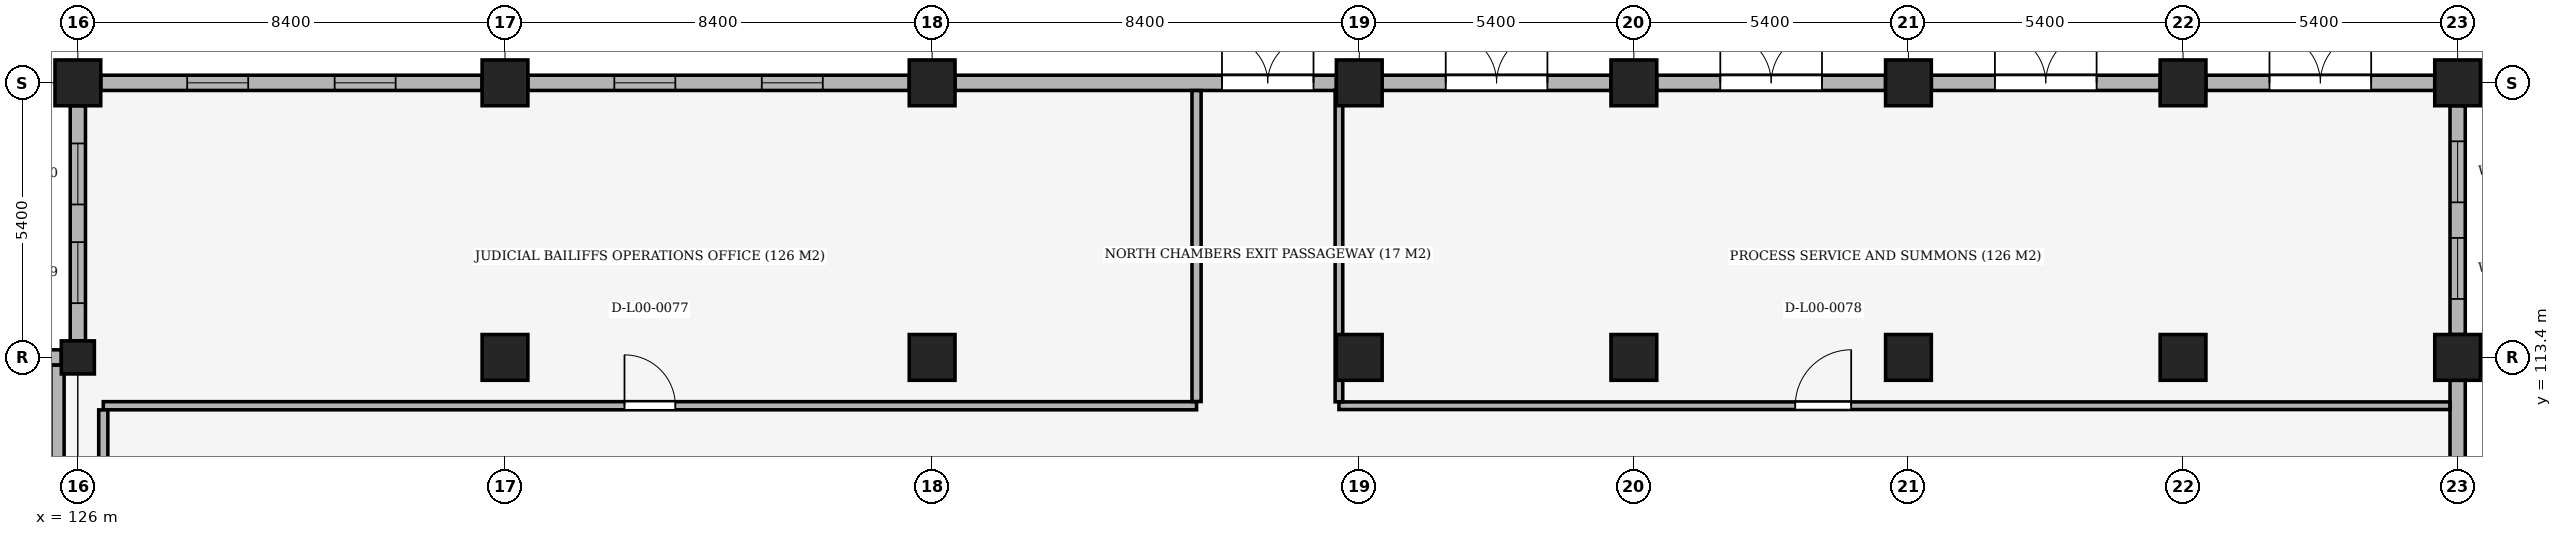
"""IFC4 building model, lengths in metres.
Left out: names, types, materials, properties, quantities, classifications, styles, units other than length and angle.
Written with IfcOpenShell. Run it as: python <this file> out.ifc"""

import sys

from ifc_helpers import new_model, si_unit, direction, frame, frame_2d, origin, origin_2d, place, context, subcontext, project, spatial, rectangle, extrude, element, fill, save


model = new_model("IFC4")
c1 = context("Model", 3, precision=1e-05, world=origin(), true_north=direction((0.0, 1.0)))
c2 = subcontext(c1, "Body", "Model", "MODEL_VIEW")
j1 = project(units=[si_unit("LENGTHUNIT", "METRE"), si_unit("PLANEANGLEUNIT", "RADIAN")], contexts=[c1])
p1 = place(None, origin())
s1 = spatial("IfcSite", under=j1, at=p1, CompositionType="ELEMENT")
p2 = place(p1, origin())
s2 = spatial("IfcBuilding", under=s1, at=p2, CompositionType="ELEMENT")
p3 = place(p2, origin())
s3 = spatial("IfcBuildingStorey", under=s2, at=p3, CompositionType="ELEMENT", Elevation=0.0)
p4 = place(p3, frame((126.0, 113.4, 0.0), z_axis=(0.0, 0.0, 1.0), x_axis=(1.0, 0.0, 0.0)))
e1 = element("IfcColumn", 1, at=p4, inside=s3, PredefinedType="COLUMN", context=c2, shape_type="SweptSolid", body=[
    extrude(rectangle(XDim=0.65, YDim=0.65, at=origin_2d()), origin(), (0.0, 0.0, 1.0), 5.1),
])
for number, where, z_axis, x_axis in (
    (2, (126.0, 118.8, 0.0), (0.0, 0.0, 1.0), (1.0, 0.0, 0.0)),
    (3, (134.4, 113.4, 0.0), (0.0, 0.0, 1.0), (1.0, 0.0, 0.0)),
    (4, (134.4, 118.8, 0.0), (0.0, 0.0, 1.0), (1.0, 0.0, 0.0)),
    (5, (142.8, 113.4, 0.0), (0.0, 0.0, 1.0), (1.0, 0.0, 0.0)),
    (6, (142.8, 118.8, 0.0), (0.0, 0.0, 1.0), (1.0, 0.0, 0.0)),
    (7, (151.2, 113.4, 0.0), (0.0, 0.0, 1.0), (1.0, 0.0, 0.0)),
    (8, (151.2, 118.8, 0.0), (0.0, 0.0, 1.0), (1.0, 0.0, 0.0)),
    (9, (156.6, 113.4, 0.0), (0.0, 0.0, 1.0), (1.0, 0.0, 0.0)),
    (10, (156.6, 118.8, 0.0), (0.0, 0.0, 1.0), (1.0, 0.0, 0.0)),
    (11, (162.0, 113.4, 0.0), (0.0, 0.0, 1.0), (1.0, 0.0, 0.0)),
    (12, (162.0, 118.8, 0.0), (0.0, 0.0, 1.0), (1.0, 0.0, 0.0)),
    (13, (167.4, 113.4, 0.0), (0.0, 0.0, 1.0), (1.0, 0.0, 0.0)),
    (14, (167.4, 118.8, 0.0), (0.0, 0.0, 1.0), (1.0, 0.0, 0.0)),
    (15, (172.8, 113.4, 0.0), (0.0, 0.0, 1.0), (1.0, 0.0, 0.0)),
    (16, (172.8, 118.8, 0.0), (0.0, 0.0, 1.0), (1.0, 0.0, 0.0)),
):
    element("IfcColumn", number, at=place(p3, frame(where, z_axis=z_axis, x_axis=x_axis)), inside=s3, PredefinedType="COLUMN", context=c2, shape_type="SweptSolid", body=[
        extrude(rectangle(XDim=0.9, YDim=0.9, at=origin_2d()), origin(), (0.0, 0.0, 1.0), 5.1),
    ])
p5 = place(p3, frame((117.925, 113.4, 0.0), z_axis=(0.0, 0.0, 1.0), x_axis=(1.0, 0.0, 0.0)))
e17 = element("IfcWall", 17, at=p5, inside=s3, PredefinedType="SOLIDWALL", context=c2, shape_type="SweptSolid", body=[
    extrude(rectangle(XDim=7.75, YDim=0.3, at=frame_2d((3.875, 0.0))), origin(), (0.0, 0.0, 1.0), 4.12),
])
p6 = place(p5, frame((1.183, 0.0, 0.9)))
e18 = element("IfcOpeningElement", 18, at=p6, cuts=e17, PredefinedType="OPENING", context=c2, shape_type="SweptSolid", body=[
    extrude(rectangle(XDim=2.1, YDim=2.1, at=frame_2d((1.05, 1.05))), frame((0.0, 0.165, 0.0), z_axis=(0.0, -1.0, 0.0), x_axis=(1.0, 0.0, 0.0)), (0.0, 0.0, 1.0), 0.33),
])
p7 = place(p5, frame((4.467, 0.0, 0.9)))
e19 = element("IfcOpeningElement", 19, at=p7, cuts=e17, PredefinedType="OPENING", context=c2, shape_type="SweptSolid", body=[
    extrude(rectangle(XDim=2.1, YDim=2.1, at=frame_2d((1.05, 1.05))), frame((0.0, 0.165, 0.0), z_axis=(0.0, -1.0, 0.0), x_axis=(1.0, 0.0, 0.0)), (0.0, 0.0, 1.0), 0.33),
])
p8 = place(p3, frame((126.0, 113.725, 0.0), z_axis=(0.0, 0.0, 1.0), x_axis=(0.0, 1.0, 0.0)))
e20 = element("IfcWall", 20, at=p8, inside=s3, PredefinedType="SOLIDWALL", context=c2, shape_type="SweptSolid", body=[
    extrude(rectangle(XDim=4.625, YDim=0.3, at=frame_2d((2.312, 0.0))), origin(), (0.0, 0.0, 1.0), 4.17),
])
p9 = place(p8, frame((0.742, 0.0, 0.85)))
e21 = element("IfcOpeningElement", 21, at=p9, cuts=e20, PredefinedType="OPENING", context=c2, shape_type="SweptSolid", body=[
    extrude(rectangle(XDim=1.2, YDim=2.4, at=frame_2d((0.6, 1.2))), frame((0.0, 0.165, 0.0), z_axis=(0.0, -1.0, 0.0), x_axis=(1.0, 0.0, 0.0)), (0.0, 0.0, 1.0), 0.33),
])
p10 = place(p8, frame((2.683, 0.0, 0.85)))
e22 = element("IfcOpeningElement", 22, at=p10, cuts=e20, PredefinedType="OPENING", context=c2, shape_type="SweptSolid", body=[
    extrude(rectangle(XDim=1.2, YDim=2.4, at=frame_2d((0.6, 1.2))), frame((0.0, 0.165, 0.0), z_axis=(0.0, -1.0, 0.0), x_axis=(1.0, 0.0, 0.0)), (0.0, 0.0, 1.0), 0.33),
])
p11 = place(p3, frame((126.45, 118.8, 0.0), z_axis=(0.0, 0.0, 1.0), x_axis=(1.0, 0.0, 0.0)))
e23 = element("IfcWall", 23, at=p11, inside=s3, PredefinedType="SOLIDWALL", context=c2, shape_type="SweptSolid", body=[
    extrude(rectangle(XDim=7.5, YDim=0.3, at=frame_2d((3.75, 0.0))), origin(), (0.0, 0.0, 1.0), 4.12),
])
p12 = place(p11, frame((1.7, 0.0, 0.85)))
e24 = element("IfcOpeningElement", 24, at=p12, cuts=e23, PredefinedType="OPENING", context=c2, shape_type="SweptSolid", body=[
    extrude(rectangle(XDim=1.2, YDim=2.4, at=frame_2d((0.6, 1.2))), frame((0.0, 0.165, 0.0), z_axis=(0.0, -1.0, 0.0), x_axis=(1.0, 0.0, 0.0)), (0.0, 0.0, 1.0), 0.33),
])
p13 = place(p11, frame((4.6, 0.0, 0.85)))
e25 = element("IfcOpeningElement", 25, at=p13, cuts=e23, PredefinedType="OPENING", context=c2, shape_type="SweptSolid", body=[
    extrude(rectangle(XDim=1.2, YDim=2.4, at=frame_2d((0.6, 1.2))), frame((0.0, 0.165, 0.0), z_axis=(0.0, -1.0, 0.0), x_axis=(1.0, 0.0, 0.0)), (0.0, 0.0, 1.0), 0.33),
])
p14 = place(p3, frame((134.85, 118.8, 0.0), z_axis=(0.0, 0.0, 1.0), x_axis=(1.0, 0.0, 0.0)))
e26 = element("IfcWall", 26, at=p14, inside=s3, PredefinedType="SOLIDWALL", context=c2, shape_type="SweptSolid", body=[
    extrude(rectangle(XDim=7.5, YDim=0.3, at=frame_2d((3.75, 0.0))), origin(), (0.0, 0.0, 1.0), 4.12),
])
p15 = place(p14, frame((1.7, 0.0, 0.85)))
e27 = element("IfcOpeningElement", 27, at=p15, cuts=e26, PredefinedType="OPENING", context=c2, shape_type="SweptSolid", body=[
    extrude(rectangle(XDim=1.2, YDim=2.4, at=frame_2d((0.6, 1.2))), frame((0.0, 0.165, 0.0), z_axis=(0.0, -1.0, 0.0), x_axis=(1.0, 0.0, 0.0)), (0.0, 0.0, 1.0), 0.33),
])
p16 = place(p14, frame((4.6, 0.0, 0.85)))
e28 = element("IfcOpeningElement", 28, at=p16, cuts=e26, PredefinedType="OPENING", context=c2, shape_type="SweptSolid", body=[
    extrude(rectangle(XDim=1.2, YDim=2.4, at=frame_2d((0.6, 1.2))), frame((0.0, 0.165, 0.0), z_axis=(0.0, -1.0, 0.0), x_axis=(1.0, 0.0, 0.0)), (0.0, 0.0, 1.0), 0.33),
])
p17 = place(p3, frame((143.25, 118.8, 0.0), z_axis=(0.0, 0.0, 1.0), x_axis=(1.0, 0.0, 0.0)))
e29 = element("IfcWall", 29, at=p17, inside=s3, PredefinedType="SOLIDWALL", context=c2, shape_type="SweptSolid", body=[
    extrude(rectangle(XDim=7.5, YDim=0.3, at=frame_2d((3.75, 0.0))), origin(), (0.0, 0.0, 1.0), 4.12),
])
p18 = place(p17, frame((5.25, 0.0, 0.0)))
e30 = element("IfcOpeningElement", 30, at=p18, cuts=e29, PredefinedType="OPENING", context=c2, shape_type="SweptSolid", body=[
    extrude(rectangle(XDim=1.8, YDim=2.2, at=frame_2d((0.9, 1.1))), frame((0.0, 0.165, 0.0), z_axis=(0.0, -1.0, 0.0), x_axis=(1.0, 0.0, 0.0)), (0.0, 0.0, 1.0), 0.33),
])
p19 = place(p3, frame((151.65, 118.8, 0.0), z_axis=(0.0, 0.0, 1.0), x_axis=(1.0, 0.0, 0.0)))
e31 = element("IfcWall", 31, at=p19, inside=s3, PredefinedType="SOLIDWALL", context=c2, shape_type="SweptSolid", body=[
    extrude(rectangle(XDim=4.5, YDim=0.3, at=frame_2d((2.25, 0.0))), origin(), (0.0, 0.0, 1.0), 4.22),
])
p20 = place(p19, frame((1.25, 0.0, 0.0)))
e32 = element("IfcOpeningElement", 32, at=p20, cuts=e31, PredefinedType="OPENING", context=c2, shape_type="SweptSolid", body=[
    extrude(rectangle(XDim=2.0, YDim=2.4, at=frame_2d((1.0, 1.2))), frame((0.0, 0.165, 0.0), z_axis=(0.0, -1.0, 0.0), x_axis=(1.0, 0.0, 0.0)), (0.0, 0.0, 1.0), 0.33),
])
p21 = place(p3, frame((157.05, 118.8, 0.0), z_axis=(0.0, 0.0, 1.0), x_axis=(1.0, 0.0, 0.0)))
e33 = element("IfcWall", 33, at=p21, inside=s3, PredefinedType="SOLIDWALL", context=c2, shape_type="SweptSolid", body=[
    extrude(rectangle(XDim=4.5, YDim=0.3, at=frame_2d((2.25, 0.0))), origin(), (0.0, 0.0, 1.0), 4.22),
])
p22 = place(p21, frame((1.25, 0.0, 0.0)))
e34 = element("IfcOpeningElement", 34, at=p22, cuts=e33, PredefinedType="OPENING", context=c2, shape_type="SweptSolid", body=[
    extrude(rectangle(XDim=2.0, YDim=2.4, at=frame_2d((1.0, 1.2))), frame((0.0, 0.165, 0.0), z_axis=(0.0, -1.0, 0.0), x_axis=(1.0, 0.0, 0.0)), (0.0, 0.0, 1.0), 0.33),
])
p23 = place(p3, frame((162.45, 118.8, 0.0), z_axis=(0.0, 0.0, 1.0), x_axis=(1.0, 0.0, 0.0)))
e35 = element("IfcWall", 35, at=p23, inside=s3, PredefinedType="SOLIDWALL", context=c2, shape_type="SweptSolid", body=[
    extrude(rectangle(XDim=4.5, YDim=0.3, at=frame_2d((2.25, 0.0))), origin(), (0.0, 0.0, 1.0), 4.22),
])
p24 = place(p23, frame((1.25, 0.0, 0.0)))
e36 = element("IfcOpeningElement", 36, at=p24, cuts=e35, PredefinedType="OPENING", context=c2, shape_type="SweptSolid", body=[
    extrude(rectangle(XDim=2.0, YDim=2.4, at=frame_2d((1.0, 1.2))), frame((0.0, 0.165, 0.0), z_axis=(0.0, -1.0, 0.0), x_axis=(1.0, 0.0, 0.0)), (0.0, 0.0, 1.0), 0.33),
])
p25 = place(p3, frame((167.85, 118.8, 0.0), z_axis=(0.0, 0.0, 1.0), x_axis=(1.0, 0.0, 0.0)))
e37 = element("IfcWall", 37, at=p25, inside=s3, PredefinedType="SOLIDWALL", context=c2, shape_type="SweptSolid", body=[
    extrude(rectangle(XDim=4.5, YDim=0.3, at=frame_2d((2.25, 0.0))), origin(), (0.0, 0.0, 1.0), 4.22),
])
p26 = place(p25, frame((1.25, 0.0, 0.0)))
e38 = element("IfcOpeningElement", 38, at=p26, cuts=e37, PredefinedType="OPENING", context=c2, shape_type="SweptSolid", body=[
    extrude(rectangle(XDim=2.0, YDim=2.4, at=frame_2d((1.0, 1.2))), frame((0.0, 0.165, 0.0), z_axis=(0.0, -1.0, 0.0), x_axis=(1.0, 0.0, 0.0)), (0.0, 0.0, 1.0), 0.33),
])
p27 = place(p3, frame((172.8, 118.35, 0.0), z_axis=(0.0, 0.0, 1.0), x_axis=(0.0, -1.0, 0.0)))
e39 = element("IfcWall", 39, at=p27, inside=s3, PredefinedType="SOLIDWALL", context=c2, shape_type="SweptSolid", body=[
    extrude(rectangle(XDim=4.5, YDim=0.3, at=frame_2d((2.25, 0.0))), origin(), (0.0, 0.0, 1.0), 4.17),
])
p28 = place(p27, frame((0.7, 0.0, 0.85)))
e40 = element("IfcOpeningElement", 40, at=p28, cuts=e39, PredefinedType="OPENING", context=c2, shape_type="SweptSolid", body=[
    extrude(rectangle(XDim=1.2, YDim=2.4, at=frame_2d((0.6, 1.2))), frame((0.0, 0.165, 0.0), z_axis=(0.0, -1.0, 0.0), x_axis=(1.0, 0.0, 0.0)), (0.0, 0.0, 1.0), 0.33),
])
p29 = place(p27, frame((2.6, 0.0, 0.85)))
e41 = element("IfcOpeningElement", 41, at=p29, cuts=e39, PredefinedType="OPENING", context=c2, shape_type="SweptSolid", body=[
    extrude(rectangle(XDim=1.2, YDim=2.4, at=frame_2d((0.6, 1.2))), frame((0.0, 0.165, 0.0), z_axis=(0.0, -1.0, 0.0), x_axis=(1.0, 0.0, 0.0)), (0.0, 0.0, 1.0), 0.33),
])
p30 = place(p3, frame((172.8, 112.95, 0.0), z_axis=(0.0, 0.0, 1.0), x_axis=(0.0, -1.0, 0.0)))
e42 = element("IfcWall", 42, at=p30, inside=s3, PredefinedType="SOLIDWALL", context=c2, shape_type="SweptSolid", body=[
    extrude(rectangle(XDim=4.5, YDim=0.3, at=frame_2d((2.25, 0.0))), origin(), (0.0, 0.0, 1.0), 4.17),
])
p31 = place(p30, frame((1.55, 0.0, 0.0)))
e43 = element("IfcOpeningElement", 43, at=p31, cuts=e42, PredefinedType="OPENING", context=c2, shape_type="SweptSolid", body=[
    extrude(rectangle(XDim=1.8, YDim=2.2, at=frame_2d((0.9, 1.1))), frame((0.0, 0.165, 0.0), z_axis=(0.0, -1.0, 0.0), x_axis=(1.0, 0.0, 0.0)), (0.0, 0.0, 1.0), 0.33),
])
p32 = place(p3, frame((126.5, 112.45, 0.0), z_axis=(0.0, 0.0, 1.0), x_axis=(1.0, 0.0, 0.0)))
e44 = element("IfcWall", 44, at=p32, inside=s3, PredefinedType="PARTITIONING", context=c2, shape_type="SweptSolid", body=[
    extrude(rectangle(XDim=21.5, YDim=0.16, at=frame_2d((10.75, 0.0))), origin(), (0.0, 0.0, 1.0), 4.17),
])
p33 = place(p32, frame((10.25, 0.0, 0.0)))
e45 = element("IfcOpeningElement", 45, at=p33, cuts=e44, PredefinedType="OPENING", context=c2, shape_type="SweptSolid", body=[
    extrude(rectangle(XDim=1.0, YDim=2.1, at=frame_2d((0.5, 1.05))), frame((0.0, 0.095, 0.0), z_axis=(0.0, -1.0, 0.0), x_axis=(1.0, 0.0, 0.0)), (0.0, 0.0, 1.0), 0.19),
])
p34 = place(p3, frame((150.8, 112.45, 0.0), z_axis=(0.0, 0.0, 1.0), x_axis=(1.0, 0.0, 0.0)))
e46 = element("IfcWall", 46, at=p34, inside=s3, PredefinedType="PARTITIONING", context=c2, shape_type="SweptSolid", body=[
    extrude(rectangle(XDim=21.848, YDim=0.15, at=frame_2d((10.924, 0.0))), origin(), (0.0, 0.0, 1.0), 4.17),
])
p35 = place(p34, frame((8.974, 0.0, 0.0)))
e47 = element("IfcOpeningElement", 47, at=p35, cuts=e46, PredefinedType="OPENING", context=c2, shape_type="SweptSolid", body=[
    extrude(rectangle(XDim=1.1, YDim=2.1, at=frame_2d((0.55, 1.05))), frame((0.0, 0.09, 0.0), z_axis=(0.0, -1.0, 0.0), x_axis=(1.0, 0.0, 0.0)), (0.0, 0.0, 1.0), 0.18),
])
p36 = place(p3, frame((125.6, 103.522, 0.0), z_axis=(0.0, 0.0, 1.0), x_axis=(0.0, 1.0, 0.0)))
e48 = element("IfcWall", 48, at=p36, inside=s3, PredefinedType="PARTITIONING", context=c2, shape_type="SweptSolid", body=[
    extrude(rectangle(XDim=9.726, YDim=0.26, at=frame_2d((4.863, 0.0))), origin(), (0.0, 0.0, 1.0), 4.12),
])
p37 = place(p3, frame((126.5, 108.55, 0.0), z_axis=(0.0, 0.0, 1.0), x_axis=(0.0, 1.0, 0.0)))
e49 = element("IfcWall", 49, at=p37, inside=s3, PredefinedType="PARTITIONING", context=c2, shape_type="SweptSolid", body=[
    extrude(rectangle(XDim=3.818, YDim=0.18, at=frame_2d((1.909, 0.0))), origin(), (0.0, 0.0, 1.0), 4.82),
])
p38 = place(p3, frame((148.0, 112.532, 0.0), z_axis=(0.0, 0.0, 1.0), x_axis=(0.0, 1.0, 0.0)))
e50 = element("IfcWall", 50, at=p38, inside=s3, PredefinedType="PARTITIONING", context=c2, shape_type="SweptSolid", body=[
    extrude(rectangle(XDim=6.116, YDim=0.18, at=frame_2d((3.058, 0.0))), origin(), (0.0, 0.0, 1.0), 4.12),
])
p39 = place(p3, frame((150.8, 112.527, 0.0), z_axis=(0.0, 0.0, 1.0), x_axis=(0.0, 1.0, 0.0)))
e51 = element("IfcWall", 51, at=p39, inside=s3, PredefinedType="PARTITIONING", context=c2, shape_type="SweptSolid", body=[
    extrude(rectangle(XDim=6.13, YDim=0.15, at=frame_2d((3.065, 0.0))), origin(), (0.0, 0.0, 1.0), 4.12),
])
p40 = place(p9, origin())
e52 = element("IfcWindow", 52, at=p40, inside=s3, PartitioningType="SINGLE_PANEL", PredefinedType="WINDOW", context=c2, shape_type="SweptSolid", body=[
    extrude(rectangle(XDim=1.2, YDim=2.4, at=frame_2d((0.6, 1.2))), frame((0.0, 0.03, 0.0), z_axis=(0.0, -1.0, 0.0), x_axis=(1.0, 0.0, 0.0)), (0.0, 0.0, 1.0), 0.06),
])
fill(e21, e52)
p41 = place(p10, origin())
e53 = element("IfcWindow", 53, at=p41, inside=s3, PartitioningType="SINGLE_PANEL", PredefinedType="WINDOW", context=c2, shape_type="SweptSolid", body=[
    extrude(rectangle(XDim=1.2, YDim=2.4, at=frame_2d((0.6, 1.2))), frame((0.0, 0.03, 0.0), z_axis=(0.0, -1.0, 0.0), x_axis=(1.0, 0.0, 0.0)), (0.0, 0.0, 1.0), 0.06),
])
fill(e22, e53)
p42 = place(p12, origin())
e54 = element("IfcWindow", 54, at=p42, inside=s3, PartitioningType="SINGLE_PANEL", PredefinedType="WINDOW", context=c2, shape_type="SweptSolid", body=[
    extrude(rectangle(XDim=1.2, YDim=2.4, at=frame_2d((0.6, 1.2))), frame((0.0, 0.03, 0.0), z_axis=(0.0, -1.0, 0.0), x_axis=(1.0, 0.0, 0.0)), (0.0, 0.0, 1.0), 0.06),
])
fill(e24, e54)
p43 = place(p13, origin())
e55 = element("IfcWindow", 55, at=p43, inside=s3, PartitioningType="SINGLE_PANEL", PredefinedType="WINDOW", context=c2, shape_type="SweptSolid", body=[
    extrude(rectangle(XDim=1.2, YDim=2.4, at=frame_2d((0.6, 1.2))), frame((0.0, 0.03, 0.0), z_axis=(0.0, -1.0, 0.0), x_axis=(1.0, 0.0, 0.0)), (0.0, 0.0, 1.0), 0.06),
])
fill(e25, e55)
p44 = place(p15, origin())
e56 = element("IfcWindow", 56, at=p44, inside=s3, PartitioningType="SINGLE_PANEL", PredefinedType="WINDOW", context=c2, shape_type="SweptSolid", body=[
    extrude(rectangle(XDim=1.2, YDim=2.4, at=frame_2d((0.6, 1.2))), frame((0.0, 0.03, 0.0), z_axis=(0.0, -1.0, 0.0), x_axis=(1.0, 0.0, 0.0)), (0.0, 0.0, 1.0), 0.06),
])
fill(e27, e56)
p45 = place(p16, origin())
e57 = element("IfcWindow", 57, at=p45, inside=s3, PartitioningType="SINGLE_PANEL", PredefinedType="WINDOW", context=c2, shape_type="SweptSolid", body=[
    extrude(rectangle(XDim=1.2, YDim=2.4, at=frame_2d((0.6, 1.2))), frame((0.0, 0.03, 0.0), z_axis=(0.0, -1.0, 0.0), x_axis=(1.0, 0.0, 0.0)), (0.0, 0.0, 1.0), 0.06),
])
fill(e28, e57)
p46 = place(p18, origin())
e58 = element("IfcDoor", 58, at=p46, inside=s3, OperationType="DOUBLE_DOOR_SINGLE_SWING", PredefinedType="DOOR", context=c2, shape_type="SweptSolid", body=[
    extrude(rectangle(XDim=1.8, YDim=2.2, at=frame_2d((0.9, 1.1))), frame((0.0, 0.025, 0.0), z_axis=(0.0, -1.0, 0.0), x_axis=(1.0, 0.0, 0.0)), (0.0, 0.0, 1.0), 0.05),
])
fill(e30, e58)
p47 = place(p20, origin())
e59 = element("IfcDoor", 59, at=p47, inside=s3, OperationType="DOUBLE_DOOR_SINGLE_SWING", PredefinedType="DOOR", context=c2, shape_type="SweptSolid", body=[
    extrude(rectangle(XDim=2.0, YDim=2.4, at=frame_2d((1.0, 1.2))), frame((0.0, 0.025, 0.0), z_axis=(0.0, -1.0, 0.0), x_axis=(1.0, 0.0, 0.0)), (0.0, 0.0, 1.0), 0.05),
])
fill(e32, e59)
p48 = place(p22, origin())
e60 = element("IfcDoor", 60, at=p48, inside=s3, OperationType="DOUBLE_DOOR_SINGLE_SWING", PredefinedType="DOOR", context=c2, shape_type="SweptSolid", body=[
    extrude(rectangle(XDim=2.0, YDim=2.4, at=frame_2d((1.0, 1.2))), frame((0.0, 0.025, 0.0), z_axis=(0.0, -1.0, 0.0), x_axis=(1.0, 0.0, 0.0)), (0.0, 0.0, 1.0), 0.05),
])
fill(e34, e60)
p49 = place(p24, origin())
e61 = element("IfcDoor", 61, at=p49, inside=s3, OperationType="DOUBLE_DOOR_SINGLE_SWING", PredefinedType="DOOR", context=c2, shape_type="SweptSolid", body=[
    extrude(rectangle(XDim=2.0, YDim=2.4, at=frame_2d((1.0, 1.2))), frame((0.0, 0.025, 0.0), z_axis=(0.0, -1.0, 0.0), x_axis=(1.0, 0.0, 0.0)), (0.0, 0.0, 1.0), 0.05),
])
fill(e36, e61)
p50 = place(p26, origin())
e62 = element("IfcDoor", 62, at=p50, inside=s3, OperationType="DOUBLE_DOOR_SINGLE_SWING", PredefinedType="DOOR", context=c2, shape_type="SweptSolid", body=[
    extrude(rectangle(XDim=2.0, YDim=2.4, at=frame_2d((1.0, 1.2))), frame((0.0, 0.025, 0.0), z_axis=(0.0, -1.0, 0.0), x_axis=(1.0, 0.0, 0.0)), (0.0, 0.0, 1.0), 0.05),
])
fill(e38, e62)
p51 = place(p28, origin())
e63 = element("IfcWindow", 63, at=p51, inside=s3, PartitioningType="SINGLE_PANEL", PredefinedType="WINDOW", context=c2, shape_type="SweptSolid", body=[
    extrude(rectangle(XDim=1.2, YDim=2.4, at=frame_2d((0.6, 1.2))), frame((0.0, 0.03, 0.0), z_axis=(0.0, -1.0, 0.0), x_axis=(1.0, 0.0, 0.0)), (0.0, 0.0, 1.0), 0.06),
])
fill(e40, e63)
p52 = place(p29, origin())
e64 = element("IfcWindow", 64, at=p52, inside=s3, PartitioningType="SINGLE_PANEL", PredefinedType="WINDOW", context=c2, shape_type="SweptSolid", body=[
    extrude(rectangle(XDim=1.2, YDim=2.4, at=frame_2d((0.6, 1.2))), frame((0.0, 0.03, 0.0), z_axis=(0.0, -1.0, 0.0), x_axis=(1.0, 0.0, 0.0)), (0.0, 0.0, 1.0), 0.06),
])
fill(e41, e64)
p53 = place(p33, origin())
e65 = element("IfcDoor", 65, at=p53, inside=s3, OperationType="SINGLE_SWING_LEFT", PredefinedType="DOOR", context=c2, shape_type="SweptSolid", body=[
    extrude(rectangle(XDim=1.0, YDim=2.1, at=frame_2d((0.5, 1.05))), frame((0.0, 0.025, 0.0), z_axis=(0.0, -1.0, 0.0), x_axis=(1.0, 0.0, 0.0)), (0.0, 0.0, 1.0), 0.05),
])
fill(e45, e65)
p54 = place(p35, origin())
e66 = element("IfcDoor", 66, at=p54, inside=s3, OperationType="SINGLE_SWING_RIGHT", PredefinedType="DOOR", context=c2, shape_type="SweptSolid", body=[
    extrude(rectangle(XDim=1.1, YDim=2.1, at=frame_2d((0.55, 1.05))), frame((0.0, 0.025, 0.0), z_axis=(0.0, -1.0, 0.0), x_axis=(1.0, 0.0, 0.0)), (0.0, 0.0, 1.0), 0.05),
])
fill(e47, e66)
save(model, sys.argv[1])
